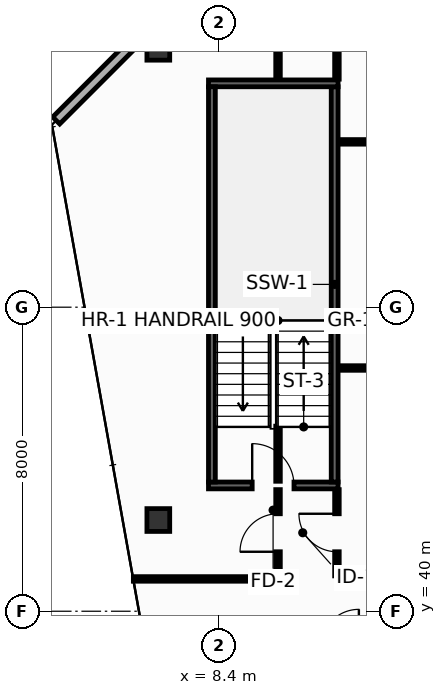
"""IFC4 building model, lengths in metres.
Left out: names, types, materials, properties, quantities, classifications, styles, units other than length and angle.
Written with IfcOpenShell. Run it as: python <this file> out.ifc"""

import sys

from ifc_helpers import new_model, si_unit, direction, frame, frame_2d, origin, origin_2d, place, context, subcontext, project, spatial, rectangle, hollow_rectangle, extrude, element, fill, save


model = new_model("IFC4")
c1 = context("Model", 3, precision=1e-05, world=origin(), true_north=direction((0.0, 1.0)))
c2 = subcontext(c1, "Body", "Model", "MODEL_VIEW")
j1 = project(units=[si_unit("LENGTHUNIT", "METRE"), si_unit("PLANEANGLEUNIT", "RADIAN")], contexts=[c1])
p1 = place(None, origin())
s1 = spatial("IfcSite", under=j1, at=p1, CompositionType="ELEMENT")
p2 = place(p1, origin())
s2 = spatial("IfcBuilding", under=s1, at=p2, CompositionType="ELEMENT")
p3 = place(p2, frame((0.0, 0.0, 261.0)))
s3 = spatial("IfcBuildingStorey", under=s2, at=p3, CompositionType="ELEMENT", Elevation=261.0)
for number, where, z_axis, x_axis in (
    (1, (6.8, 54.8, 0.0), (0.0, 0.0, 1.0), (1.0, 0.0, 0.0)),
    (2, (6.8, 42.4, 0.0), (0.0, 0.0, 1.0), (1.0, 0.0, 0.0)),
):
    element("IfcColumn", number, at=place(p3, frame(where, z_axis=z_axis, x_axis=x_axis)), inside=s3, PredefinedType="COLUMN", context=c2, shape_type="SweptSolid", body=[
        extrude(hollow_rectangle(XDim=0.6, YDim=0.6, WallThickness=0.028, at=origin_2d()), origin(), (0.0, 0.0, 1.0), 3.8),
    ])
p4 = place(p3, frame((8.12, 43.31, 0.0), z_axis=(0.0, 0.0, 1.0), x_axis=(1.0, 0.0, 0.0)))
e3 = element("IfcWall", 3, at=p4, inside=s3, PredefinedType="SHEAR", context=c2, shape_type="SweptSolid", body=[
    extrude(rectangle(XDim=3.41, YDim=0.18, at=frame_2d((1.705, 0.0))), origin(), (0.0, 0.0, 1.0), 3.55),
])
p5 = place(p4, frame((1.15, 0.0, 0.0)))
e4 = element("IfcOpeningElement", 4, at=p5, cuts=e3, PredefinedType="OPENING", context=c2, shape_type="SweptSolid", body=[
    extrude(rectangle(XDim=1.1, YDim=2.15, at=frame_2d((0.55, 1.075))), frame((0.0, 0.1, 0.0), z_axis=(0.0, -1.0, 0.0), x_axis=(1.0, 0.0, 0.0)), (0.0, 0.0, 1.0), 0.2),
])
p6 = place(p3, frame((11.44, 43.4, 0.0), z_axis=(0.0, 0.0, 1.0), x_axis=(0.0, 1.0, 0.0)))
e5 = element("IfcWall", 5, at=p6, inside=s3, PredefinedType="SHEAR", context=c2, shape_type="SweptSolid", body=[
    extrude(rectangle(XDim=10.4, YDim=0.18, at=frame_2d((5.2, 0.0))), origin(), (0.0, 0.0, 1.0), 3.55),
])
p7 = place(p3, frame((11.53, 53.89, 0.0), z_axis=(0.0, 0.0, 1.0), x_axis=(-1.0, 0.0, 0.0)))
e6 = element("IfcWall", 6, at=p7, inside=s3, PredefinedType="SHEAR", context=c2, shape_type="SweptSolid", body=[
    extrude(rectangle(XDim=3.41, YDim=0.18, at=frame_2d((1.705, 0.0))), origin(), (0.0, 0.0, 1.0), 3.55),
])
p8 = place(p3, frame((8.21, 53.8, 0.0), z_axis=(0.0, 0.0, 1.0), x_axis=(0.0, -1.0, 0.0)))
e7 = element("IfcWall", 7, at=p8, inside=s3, PredefinedType="SHEAR", context=c2, shape_type="SweptSolid", body=[
    extrude(rectangle(XDim=10.4, YDim=0.18, at=frame_2d((5.2, 0.0))), origin(), (0.0, 0.0, 1.0), 3.55),
])
p9 = place(p3, frame((7.087, 55.887, 0.0), z_axis=(0.0, 0.0, 1.0), x_axis=(-0.707106781187, -0.707106781187, 0.0)))
e8 = element("IfcWall", 8, at=p9, inside=s3, PredefinedType="STANDARD", context=c2, shape_type="SweptSolid", body=[
    extrude(rectangle(XDim=4.206, YDim=0.26, at=frame_2d((2.103, 0.0))), origin(), (0.0, 0.0, 1.0), 3.55),
])
p10 = place(p3, frame((6.143, 40.85, 0.0), z_axis=(0.0, 0.0, 1.0), x_axis=(1.0, 0.0, 0.0)))
e9 = element("IfcWall", 9, at=p10, inside=s3, PredefinedType="PARTITIONING", context=c2, shape_type="SweptSolid", body=[
    extrude(rectangle(XDim=3.807, YDim=0.12, at=frame_2d((1.903, 0.0))), origin(), (0.0, 0.0, 1.0), 3.085),
])
p11 = place(p3, frame((11.5, 40.85, 0.0), z_axis=(0.0, 0.0, 1.0), x_axis=(1.0, 0.0, 0.0)))
e10 = element("IfcWall", 10, at=p11, inside=s3, PredefinedType="PARTITIONING", context=c2, shape_type="SweptSolid", body=[
    extrude(rectangle(XDim=2.35, YDim=0.12, at=frame_2d((1.175, 0.0))), origin(), (0.0, 0.0, 1.0), 3.55),
])
p12 = place(p3, frame((11.55, 52.35, 0.0), z_axis=(0.0, 0.0, 1.0), x_axis=(1.0, 0.0, 0.0)))
e11 = element("IfcWall", 11, at=p12, inside=s3, PredefinedType="PARTITIONING", context=c2, shape_type="SweptSolid", body=[
    extrude(rectangle(XDim=2.13, YDim=0.12, at=frame_2d((1.065, 0.0))), origin(), (0.0, 0.0, 1.0), 3.55),
])
p13 = place(p3, frame((11.5, 54.0, 0.0), z_axis=(0.0, 0.0, 1.0), x_axis=(0.0, 1.0, 0.0)))
e12 = element("IfcWall", 12, at=p13, inside=s3, PredefinedType="PARTITIONING", context=c2, shape_type="SweptSolid", body=[
    extrude(rectangle(XDim=1.995, YDim=0.12, at=frame_2d((0.998, 0.0))), origin(), (0.0, 0.0, 1.0), 2.935),
])
p14 = place(p3, frame((4.936, 47.6, 0.0), z_axis=(0.0, 0.0, 1.0), x_axis=(1.0, 0.0, 0.0)))
e13 = element("IfcWall", 13, at=p14, inside=s3, PredefinedType="PARTITIONING", context=c2, shape_type="SweptSolid", body=[
    extrude(rectangle(XDim=3.165, YDim=0.12, at=frame_2d((1.582, 0.0))), origin(), (0.0, 0.0, 1.0), 2.947),
])
p15 = place(p3, frame((9.95, 40.93, 0.0), z_axis=(0.0, 0.0, 1.0), x_axis=(0.0, 1.0, 0.0)))
e14 = element("IfcWall", 14, at=p15, inside=s3, PredefinedType="PARTITIONING", context=c2, shape_type="SweptSolid", body=[
    extrude(rectangle(XDim=2.27, YDim=0.12, at=frame_2d((1.135, 0.0))), origin(), (0.0, 0.0, 1.0), 2.947),
])
p16 = place(p15, frame((0.635, 0.0, 0.0)))
e15 = element("IfcOpeningElement", 15, at=p16, cuts=e14, PredefinedType="OPENING", context=c2, shape_type="SweptSolid", body=[
    extrude(rectangle(XDim=1.0, YDim=2.15, at=frame_2d((0.5, 1.075))), frame((0.0, 0.07, 0.0), z_axis=(0.0, -1.0, 0.0), x_axis=(1.0, 0.0, 0.0)), (0.0, 0.0, 1.0), 0.14),
])
p17 = place(p3, frame((9.95, 43.42, 0.0), z_axis=(0.0, 0.0, 1.0), x_axis=(0.0, 1.0, 0.0)))
e16 = element("IfcWall", 16, at=p17, inside=s3, PredefinedType="PARTITIONING", context=c2, shape_type="SweptSolid", body=[
    extrude(rectangle(XDim=1.45, YDim=0.12, at=frame_2d((0.725, 0.0))), origin(), (0.0, 0.0, 1.0), 3.55),
])
p18 = place(p3, frame((9.95, 54.0, 0.0), z_axis=(0.0, 0.0, 1.0), x_axis=(0.0, 1.0, 0.0)))
e17 = element("IfcWall", 17, at=p18, inside=s3, PredefinedType="PARTITIONING", context=c2, shape_type="SweptSolid", body=[
    extrude(rectangle(XDim=1.995, YDim=0.12, at=frame_2d((0.998, 0.0))), origin(), (0.0, 0.0, 1.0), 2.935),
])
p19 = place(p3, frame((11.55, 46.4, 0.0), z_axis=(0.0, 0.0, 1.0), x_axis=(1.0, 0.0, 0.0)))
e18 = element("IfcWall", 18, at=p19, inside=s3, PredefinedType="PARTITIONING", context=c2, shape_type="SweptSolid", body=[
    extrude(rectangle(XDim=2.13, YDim=0.12, at=frame_2d((1.065, 0.0))), origin(), (0.0, 0.0, 1.0), 3.55),
])
p20 = place(p3, frame((11.5, 40.93, 0.0), z_axis=(0.0, 0.0, 1.0), x_axis=(0.0, 1.0, 0.0)))
e19 = element("IfcWall", 19, at=p20, inside=s3, PredefinedType="PARTITIONING", context=c2, shape_type="SweptSolid", body=[
    extrude(rectangle(XDim=2.27, YDim=0.12, at=frame_2d((1.135, 0.0))), origin(), (0.0, 0.0, 1.0), 2.947),
])
p21 = place(p20, frame((0.635, 0.0, 0.0)))
e20 = element("IfcOpeningElement", 20, at=p21, cuts=e19, PredefinedType="OPENING", context=c2, shape_type="SweptSolid", body=[
    extrude(rectangle(XDim=1.0, YDim=2.15, at=frame_2d((0.5, 1.075))), frame((0.0, 0.07, 0.0), z_axis=(0.0, -1.0, 0.0), x_axis=(1.0, 0.0, 0.0)), (0.0, 0.0, 1.0), 0.14),
])
p22 = place(p5, origin())
e21 = element("IfcDoor", 21, at=p22, inside=s3, OperationType="SINGLE_SWING_LEFT", PredefinedType="DOOR", context=c2, shape_type="SweptSolid", body=[
    extrude(rectangle(XDim=1.1, YDim=2.15, at=frame_2d((0.55, 1.075))), frame((0.0, 0.025, 0.0), z_axis=(0.0, -1.0, 0.0), x_axis=(1.0, 0.0, 0.0)), (0.0, 0.0, 1.0), 0.05),
])
fill(e4, e21)
p23 = place(p16, origin())
e22 = element("IfcDoor", 22, at=p23, inside=s3, OperationType="SINGLE_SWING_LEFT", PredefinedType="DOOR", context=c2, shape_type="SweptSolid", body=[
    extrude(rectangle(XDim=1.0, YDim=2.15, at=frame_2d((0.5, 1.075))), frame((0.0, 0.025, 0.0), z_axis=(0.0, -1.0, 0.0), x_axis=(1.0, 0.0, 0.0)), (0.0, 0.0, 1.0), 0.05),
])
fill(e15, e22)
p24 = place(p21, origin())
e23 = element("IfcDoor", 23, at=p24, inside=s3, OperationType="SINGLE_SWING_RIGHT", PredefinedType="DOOR", context=c2, shape_type="SweptSolid", body=[
    extrude(rectangle(XDim=1.0, YDim=2.15, at=frame_2d((0.5, 1.075))), frame((0.0, 0.025, 0.0), z_axis=(0.0, -1.0, 0.0), x_axis=(1.0, 0.0, 0.0)), (0.0, 0.0, 1.0), 0.05),
])
fill(e20, e23)
save(model, sys.argv[1])
